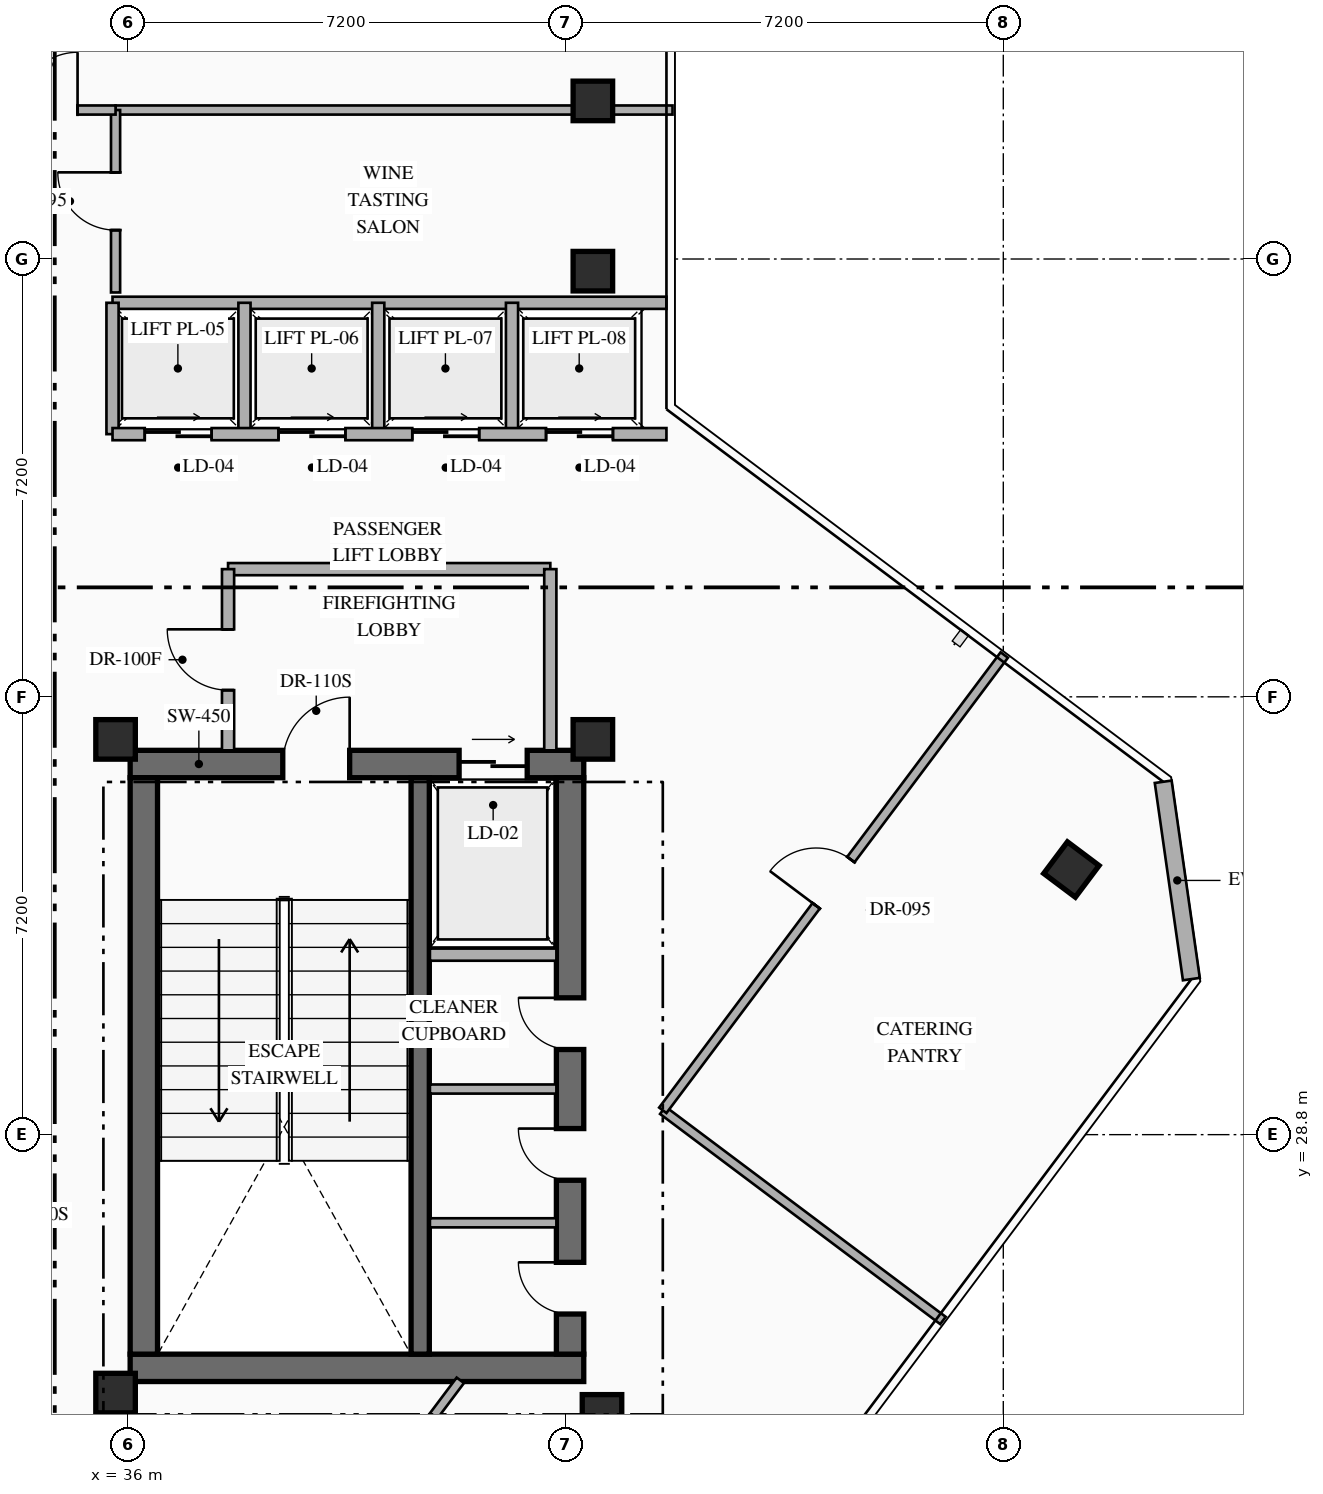
"""IFC4 building model, lengths in metres.
Left out: names, types, materials, properties, quantities, classifications, styles, units other than length and angle.
Written with IfcOpenShell. Run it as: python <this file> out.ifc"""

import sys

from ifc_helpers import new_model, si_unit, direction, frame, frame_2d, origin, origin_2d, place, context, subcontext, project, spatial, rectangle, hollow_rectangle, extrude, element, fill, save


model = new_model("IFC4")
c1 = context("Model", 3, precision=1e-05, world=origin(), true_north=direction((0.0, 1.0)))
c2 = subcontext(c1, "Body", "Model", "MODEL_VIEW")
j1 = project(units=[si_unit("LENGTHUNIT", "METRE"), si_unit("PLANEANGLEUNIT", "RADIAN")], contexts=[c1])
p1 = place(None, origin())
s1 = spatial("IfcSite", under=j1, at=p1, CompositionType="ELEMENT")
p2 = place(p1, origin())
s2 = spatial("IfcBuilding", under=s1, at=p2, CompositionType="ELEMENT")
p3 = place(p2, frame((0.0, 0.0, 261.75)))
s3 = spatial("IfcBuildingStorey", under=s2, at=p3, CompositionType="ELEMENT", Elevation=261.75)
p4 = place(p3, frame((36.04, 24.965, 0.0), z_axis=(0.0, 0.0, 1.0), x_axis=(1.0, 0.0, 0.0)))
e1 = element("IfcWall", 1, at=p4, inside=s3, PredefinedType="SHEAR", context=c2, shape_type="SweptSolid", body=[
    extrude(rectangle(XDim=7.46, YDim=0.45, at=frame_2d((3.73, 0.0))), origin(), (0.0, 0.0, 1.0), 4.2),
])
p5 = place(p3, frame((36.04, 34.895, 0.0), z_axis=(0.0, 0.0, 1.0), x_axis=(1.0, 0.0, 0.0)))
e2 = element("IfcWall", 2, at=p5, inside=s3, PredefinedType="SHEAR", context=c2, shape_type="SweptSolid", body=[
    extrude(rectangle(XDim=7.46, YDim=0.45, at=frame_2d((3.73, 0.0))), origin(), (0.0, 0.0, 1.0), 4.2),
])
p6 = place(p5, frame((2.51, 0.0, 0.0)))
e3 = element("IfcOpeningElement", 3, at=p6, cuts=e2, PredefinedType="OPENING", context=c2, shape_type="SweptSolid", body=[
    extrude(rectangle(XDim=1.1, YDim=2.2, at=frame_2d((0.55, 1.1))), frame((0.0, 0.235, 0.0), z_axis=(0.0, -1.0, 0.0), x_axis=(1.0, 0.0, 0.0)), (0.0, 0.0, 1.0), 0.47),
])
p7 = place(p5, frame((5.41, 0.0, 0.0)))
e4 = element("IfcOpeningElement", 4, at=p7, cuts=e2, PredefinedType="OPENING", context=c2, shape_type="SweptSolid", body=[
    extrude(rectangle(XDim=1.12, YDim=2.15, at=frame_2d((0.56, 1.075))), frame((0.0, 0.235, 0.0), z_axis=(0.0, -1.0, 0.0), x_axis=(1.0, 0.0, 0.0)), (0.0, 0.0, 1.0), 0.47),
])
p8 = place(p3, frame((36.265, 25.19, 0.0), z_axis=(0.0, 0.0, 1.0), x_axis=(0.0, 1.0, 0.0)))
e5 = element("IfcWall", 5, at=p8, inside=s3, PredefinedType="SHEAR", context=c2, shape_type="SweptSolid", body=[
    extrude(rectangle(XDim=9.48, YDim=0.45, at=frame_2d((4.74, 0.0))), origin(), (0.0, 0.0, 1.0), 4.2),
])
p9 = place(p3, frame((43.275, 25.19, 0.0), z_axis=(0.0, 0.0, 1.0), x_axis=(0.0, 1.0, 0.0)))
e6 = element("IfcWall", 6, at=p9, inside=s3, PredefinedType="SHEAR", context=c2, shape_type="SweptSolid", body=[
    extrude(rectangle(XDim=9.48, YDim=0.45, at=frame_2d((4.74, 0.0))), origin(), (0.0, 0.0, 1.0), 4.2),
])
p10 = place(p9, frame((0.66, 0.0, 0.0)))
e7 = element("IfcOpeningElement", 7, at=p10, cuts=e6, PredefinedType="OPENING", context=c2, shape_type="SweptSolid", body=[
    extrude(rectangle(XDim=0.85, YDim=2.08, at=frame_2d((0.425, 1.04))), frame((0.0, 0.235, 0.0), z_axis=(0.0, -1.0, 0.0), x_axis=(1.0, 0.0, 0.0)), (0.0, 0.0, 1.0), 0.47),
])
p11 = place(p9, frame((2.86, 0.0, 0.0)))
e8 = element("IfcOpeningElement", 8, at=p11, cuts=e6, PredefinedType="OPENING", context=c2, shape_type="SweptSolid", body=[
    extrude(rectangle(XDim=0.85, YDim=2.08, at=frame_2d((0.425, 1.04))), frame((0.0, 0.235, 0.0), z_axis=(0.0, -1.0, 0.0), x_axis=(1.0, 0.0, 0.0)), (0.0, 0.0, 1.0), 0.47),
])
p12 = place(p9, frame((5.01, 0.0, 0.0)))
e9 = element("IfcOpeningElement", 9, at=p12, cuts=e6, PredefinedType="OPENING", context=c2, shape_type="SweptSolid", body=[
    extrude(rectangle(XDim=0.85, YDim=2.08, at=frame_2d((0.425, 1.04))), frame((0.0, 0.235, 0.0), z_axis=(0.0, -1.0, 0.0), x_axis=(1.0, 0.0, 0.0)), (0.0, 0.0, 1.0), 0.47),
])
p13 = place(p3, frame((40.81, 25.19, 0.0), z_axis=(0.0, 0.0, 1.0), x_axis=(0.0, 1.0, 0.0)))
e10 = element("IfcWall", 10, at=p13, inside=s3, PredefinedType="SHEAR", context=c2, shape_type="SweptSolid", body=[
    extrude(rectangle(XDim=9.48, YDim=0.3, at=frame_2d((4.74, 0.0))), origin(), (0.0, 0.0, 1.0), 4.2),
])
for number, where, z_axis, x_axis in (
    (11, (35.8, 24.55, 0.0), (0.0, 0.0, 1.0), (1.0, 0.0, 0.0)),
    (12, (43.8, 24.2, 0.0), (0.0, 0.0, 1.0), (1.0, 0.0, 0.0)),
    (13, (35.8, 35.3, 0.0), (0.0, 0.0, 1.0), (1.0, 0.0, 0.0)),
    (14, (43.65, 35.3, 0.0), (0.0, 0.0, 1.0), (1.0, 0.0, 0.0)),
    (15, (43.65, 43.0, 0.0), (0.0, 0.0, 1.0), (1.0, 0.0, 0.0)),
    (16, (43.65, 45.8, 0.0), (0.0, 0.0, 1.0), (1.0, 0.0, 0.0)),
    (17, (51.52, 33.16, 0.0), (0.0, 0.0, 1.0), (0.8, -0.6, 0.0)),
):
    element("IfcColumn", number, at=place(p3, frame(where, z_axis=z_axis, x_axis=x_axis)), inside=s3, PredefinedType="COLUMN", context=c2, shape_type="SweptSolid", body=[
        extrude(hollow_rectangle(XDim=0.65, YDim=0.65, WallThickness=0.025, at=origin_2d()), origin(), (0.0, 0.0, 1.0), 4.2),
    ])
p14 = place(p3, frame((53.03, 34.603, 0.0), z_axis=(0.0, 0.0, 1.0), x_axis=(0.141212810973, -0.989979263428, 0.0)))
e18 = element("IfcWall", 18, at=p14, inside=s3, PredefinedType="STANDARD", context=c2, shape_type="SweptSolid", body=[
    extrude(rectangle(XDim=3.278, YDim=0.28, at=frame_2d((1.639, 0.0))), origin(), (0.0, 0.0, 1.0), 3.94),
])
p15 = place(p3, frame((40.97, 31.76, 0.0), z_axis=(0.0, 0.0, 1.0), x_axis=(1.0, 0.0, 0.0)))
e19 = element("IfcWall", 19, at=p15, inside=s3, PredefinedType="STANDARD", context=c2, shape_type="SweptSolid", body=[
    extrude(rectangle(XDim=2.08, YDim=0.2, at=frame_2d((1.04, 0.0))), origin(), (0.0, 0.0, 1.0), 3.94),
])
for number, where, z_axis, x_axis in (
    (20, (40.97, 27.35, 0.0), (0.0, 0.0, 1.0), (1.0, 0.0, 0.0)),
    (21, (40.97, 29.55, 0.0), (0.0, 0.0, 1.0), (1.0, 0.0, 0.0)),
):
    element("IfcWall", number, at=place(p3, frame(where, z_axis=z_axis, x_axis=x_axis)), inside=s3, PredefinedType="PARTITIONING", context=c2, shape_type="SweptSolid", body=[
        extrude(rectangle(XDim=2.08, YDim=0.15, at=frame_2d((1.04, 0.0))), origin(), (0.0, 0.0, 1.0), 3.94),
    ])
p16 = place(p3, frame((37.65, 38.1, 0.0), z_axis=(0.0, 0.0, 1.0), x_axis=(1.0, 0.0, 0.0)))
e22 = element("IfcWall", 22, at=p16, inside=s3, PredefinedType="STANDARD", context=c2, shape_type="SweptSolid", body=[
    extrude(rectangle(XDim=5.3, YDim=0.2, at=frame_2d((2.65, 0.0))), origin(), (0.0, 0.0, 1.0), 3.94),
])
p17 = place(p3, frame((42.95, 35.12, 0.0), z_axis=(0.0, 0.0, 1.0), x_axis=(0.0, 1.0, 0.0)))
e23 = element("IfcWall", 23, at=p17, inside=s3, PredefinedType="STANDARD", context=c2, shape_type="SweptSolid", body=[
    extrude(rectangle(XDim=2.98, YDim=0.2, at=frame_2d((1.49, 0.0))), origin(), (0.0, 0.0, 1.0), 3.94),
])
p18 = place(p3, frame((37.65, 35.12, 0.0), z_axis=(0.0, 0.0, 1.0), x_axis=(0.0, 1.0, 0.0)))
e24 = element("IfcWall", 24, at=p18, inside=s3, PredefinedType="STANDARD", context=c2, shape_type="SweptSolid", body=[
    extrude(rectangle(XDim=2.98, YDim=0.2, at=frame_2d((1.49, 0.0))), origin(), (0.0, 0.0, 1.0), 3.94),
])
p19 = place(p18, frame((0.99, 0.0, 0.0)))
e25 = element("IfcOpeningElement", 25, at=p19, cuts=e24, PredefinedType="OPENING", context=c2, shape_type="SweptSolid", body=[
    extrude(rectangle(XDim=1.0, YDim=2.2, at=frame_2d((0.5, 1.1))), frame((0.0, 0.11, 0.0), z_axis=(0.0, -1.0, 0.0), x_axis=(1.0, 0.0, 0.0)), (0.0, 0.0, 1.0), 0.22),
])
p20 = place(p3, frame((35.75, 42.48, 0.0), z_axis=(0.0, 0.0, 1.0), x_axis=(1.0, 0.0, 0.0)))
e26 = element("IfcWall", 26, at=p20, inside=s3, PredefinedType="STANDARD", context=c2, shape_type="SweptSolid", body=[
    extrude(rectangle(XDim=9.11, YDim=0.2, at=frame_2d((4.555, 0.0))), origin(), (0.0, 0.0, 1.0), 3.94),
])
for number, where, z_axis, x_axis in (
    (27, (35.75, 40.32, 0.0), (0.0, 0.0, 1.0), (0.0, 1.0, 0.0)),
    (28, (37.92, 40.32, 0.0), (0.0, 0.0, 1.0), (0.0, 1.0, 0.0)),
    (29, (40.12, 40.32, 0.0), (0.0, 0.0, 1.0), (0.0, 1.0, 0.0)),
    (30, (42.32, 40.32, 0.0), (0.0, 0.0, 1.0), (0.0, 1.0, 0.0)),
):
    element("IfcWall", number, at=place(p3, frame(where, z_axis=z_axis, x_axis=x_axis)), inside=s3, PredefinedType="STANDARD", context=c2, shape_type="SweptSolid", body=[
        extrude(rectangle(XDim=2.16, YDim=0.2, at=frame_2d((1.08, 0.0))), origin(), (0.0, 0.0, 1.0), 3.94),
    ])
p21 = place(p3, frame((35.75, 40.32, 0.0), z_axis=(0.0, 0.0, 1.0), x_axis=(1.0, 0.0, 0.0)))
e31 = element("IfcWall", 31, at=p21, inside=s3, PredefinedType="STANDARD", context=c2, shape_type="SweptSolid", body=[
    extrude(rectangle(XDim=9.11, YDim=0.2, at=frame_2d((4.555, 0.0))), origin(), (0.0, 0.0, 1.0), 3.94),
])
p22 = place(p21, frame((0.53, 0.0, 0.0)))
e32 = element("IfcOpeningElement", 32, at=p22, cuts=e31, PredefinedType="OPENING", context=c2, shape_type="SweptSolid", body=[
    extrude(rectangle(XDim=1.1, YDim=2.18, at=frame_2d((0.55, 1.09))), frame((0.0, 0.11, 0.0), z_axis=(0.0, -1.0, 0.0), x_axis=(1.0, 0.0, 0.0)), (0.0, 0.0, 1.0), 0.22),
])
p23 = place(p21, frame((2.73, 0.0, 0.0)))
e33 = element("IfcOpeningElement", 33, at=p23, cuts=e31, PredefinedType="OPENING", context=c2, shape_type="SweptSolid", body=[
    extrude(rectangle(XDim=1.1, YDim=2.18, at=frame_2d((0.55, 1.09))), frame((0.0, 0.11, 0.0), z_axis=(0.0, -1.0, 0.0), x_axis=(1.0, 0.0, 0.0)), (0.0, 0.0, 1.0), 0.22),
])
p24 = place(p21, frame((4.93, 0.0, 0.0)))
e34 = element("IfcOpeningElement", 34, at=p24, cuts=e31, PredefinedType="OPENING", context=c2, shape_type="SweptSolid", body=[
    extrude(rectangle(XDim=1.1, YDim=2.18, at=frame_2d((0.55, 1.09))), frame((0.0, 0.11, 0.0), z_axis=(0.0, -1.0, 0.0), x_axis=(1.0, 0.0, 0.0)), (0.0, 0.0, 1.0), 0.22),
])
p25 = place(p21, frame((7.13, 0.0, 0.0)))
e35 = element("IfcOpeningElement", 35, at=p25, cuts=e31, PredefinedType="OPENING", context=c2, shape_type="SweptSolid", body=[
    extrude(rectangle(XDim=1.1, YDim=2.18, at=frame_2d((0.55, 1.09))), frame((0.0, 0.11, 0.0), z_axis=(0.0, -1.0, 0.0), x_axis=(1.0, 0.0, 0.0)), (0.0, 0.0, 1.0), 0.22),
])
p26 = place(p3, frame((35.8, 45.65, 0.0), z_axis=(0.0, 0.0, 1.0), x_axis=(1.0, 0.0, 0.0)))
e36 = element("IfcWall", 36, at=p26, inside=s3, PredefinedType="PARTITIONING", context=c2, shape_type="SweptSolid", body=[
    extrude(rectangle(XDim=9.16, YDim=0.15, at=frame_2d((4.58, 0.0))), origin(), (0.0, 0.0, 1.0), 3.357),
])
p27 = place(p3, frame((35.8, 42.65, 0.0), z_axis=(0.0, 0.0, 1.0), x_axis=(0.0, 1.0, 0.0)))
e37 = element("IfcWall", 37, at=p27, inside=s3, PredefinedType="PARTITIONING", context=c2, shape_type="SweptSolid", body=[
    extrude(rectangle(XDim=3.0, YDim=0.15, at=frame_2d((1.5, 0.0))), origin(), (0.0, 0.0, 1.0), 3.94),
])
p28 = place(p27, frame((1.025, 0.0, 0.0)))
e38 = element("IfcOpeningElement", 38, at=p28, cuts=e37, PredefinedType="OPENING", context=c2, shape_type="SweptSolid", body=[
    extrude(rectangle(XDim=0.95, YDim=2.15, at=frame_2d((0.475, 1.075))), frame((0.0, 0.085, 0.0), z_axis=(0.0, -1.0, 0.0), x_axis=(1.0, 0.0, 0.0)), (0.0, 0.0, 1.0), 0.17),
])
p29 = place(p3, frame((28.47, 25.76, 0.0), z_axis=(0.0, 0.0, 1.0), x_axis=(0.800001748029, -0.599997669287, 0.0)))
e39 = element("IfcWall", 39, at=p29, inside=s3, PredefinedType="PARTITIONING", context=c2, shape_type="SweptSolid", body=[
    extrude(rectangle(XDim=16.76, YDim=0.15, at=frame_2d((8.38, 0.0))), origin(), (0.0, 0.0, 1.0), 3.94),
])
p30 = place(p29, frame((7.905, 0.0, 0.0)))
e40 = element("IfcOpeningElement", 40, at=p30, cuts=e39, PredefinedType="OPENING", context=c2, shape_type="SweptSolid", body=[
    extrude(rectangle(XDim=0.95, YDim=2.15, at=frame_2d((0.475, 1.075))), frame((0.0, 0.085, 0.0), z_axis=(0.0, -1.0, 0.0), x_axis=(1.0, 0.0, 0.0)), (0.0, 0.0, 1.0), 0.17),
])
p31 = place(p3, frame((33.6, 45.65, 0.0), z_axis=(0.0, 0.0, 1.0), x_axis=(1.0, 0.0, 0.0)))
e41 = element("IfcWall", 41, at=p31, inside=s3, PredefinedType="PARTITIONING", context=c2, shape_type="SweptSolid", body=[
    extrude(rectangle(XDim=2.2, YDim=0.15, at=frame_2d((1.1, 0.0))), origin(), (0.0, 0.0, 1.0), 3.357),
])
p32 = place(p31, frame((0.625, 0.0, 0.0)))
e42 = element("IfcOpeningElement", 42, at=p32, cuts=e41, PredefinedType="OPENING", context=c2, shape_type="SweptSolid", body=[
    extrude(rectangle(XDim=0.95, YDim=2.15, at=frame_2d((0.475, 1.075))), frame((0.0, 0.085, 0.0), z_axis=(0.0, -1.0, 0.0), x_axis=(1.0, 0.0, 0.0)), (0.0, 0.0, 1.0), 0.17),
])
p33 = place(p3, frame((44.8, 29.2, 0.0), z_axis=(0.0, 0.0, 1.0), x_axis=(0.79998982729, -0.600013563374, 0.0)))
e43 = element("IfcWall", 43, at=p33, inside=s3, PredefinedType="PARTITIONING", context=c2, shape_type="SweptSolid", body=[
    extrude(rectangle(XDim=5.76, YDim=0.15, at=frame_2d((2.88, 0.0))), origin(), (0.0, 0.0, 1.0), 3.94),
])
p34 = place(p3, frame((38.35, 20.6, 0.0), z_axis=(0.0, 0.0, 1.0), x_axis=(0.599992487743, 0.800005634138, 0.0)))
e44 = element("IfcWall", 44, at=p34, inside=s3, PredefinedType="PARTITIONING", context=c2, shape_type="SweptSolid", body=[
    extrude(rectangle(XDim=5.2, YDim=0.15, at=frame_2d((2.6, 0.0))), origin(), (0.0, 0.0, 1.0), 3.94),
])
p35 = place(p34, frame((2.05, 0.0, 0.0)))
e45 = element("IfcOpeningElement", 45, at=p35, cuts=e44, PredefinedType="OPENING", context=c2, shape_type="SweptSolid", body=[
    extrude(rectangle(XDim=1.1, YDim=2.16, at=frame_2d((0.55, 1.08))), frame((0.0, 0.085, 0.0), z_axis=(0.0, -1.0, 0.0), x_axis=(1.0, 0.0, 0.0)), (0.0, 0.0, 1.0), 0.17),
])
p36 = place(p3, frame((44.8, 29.2, 0.0), z_axis=(0.0, 0.0, 1.0), x_axis=(0.599995826652, 0.800003129994, 0.0)))
e46 = element("IfcWall", 46, at=p36, inside=s3, PredefinedType="PARTITIONING", context=c2, shape_type="SweptSolid", body=[
    extrude(rectangle(XDim=9.36, YDim=0.15, at=frame_2d((4.68, 0.0))), origin(), (0.0, 0.0, 1.0), 3.94),
])
p37 = place(p36, frame((4.205, 0.0, 0.0)))
e47 = element("IfcOpeningElement", 47, at=p37, cuts=e46, PredefinedType="OPENING", context=c2, shape_type="SweptSolid", body=[
    extrude(rectangle(XDim=0.95, YDim=2.15, at=frame_2d((0.475, 1.075))), frame((0.0, 0.085, 0.0), z_axis=(0.0, -1.0, 0.0), x_axis=(1.0, 0.0, 0.0)), (0.0, 0.0, 1.0), 0.17),
])
p38 = place(p6, origin())
e48 = element("IfcDoor", 48, at=p38, inside=s3, OperationType="SINGLE_SWING_RIGHT", PredefinedType="DOOR", context=c2, shape_type="SweptSolid", body=[
    extrude(rectangle(XDim=1.1, YDim=2.2, at=frame_2d((0.55, 1.1))), frame((0.0, 0.025, 0.0), z_axis=(0.0, -1.0, 0.0), x_axis=(1.0, 0.0, 0.0)), (0.0, 0.0, 1.0), 0.05),
])
fill(e3, e48)
p39 = place(p7, origin())
e49 = element("IfcDoor", 49, at=p39, inside=s3, OperationType="SLIDING_TO_RIGHT", PredefinedType="USERDEFINED", context=c2, shape_type="SweptSolid", body=[
    extrude(rectangle(XDim=1.12, YDim=2.15, at=frame_2d((0.56, 1.075))), frame((0.0, 0.025, 0.0), z_axis=(0.0, -1.0, 0.0), x_axis=(1.0, 0.0, 0.0)), (0.0, 0.0, 1.0), 0.05),
])
fill(e4, e49)
p40 = place(p10, origin())
e50 = element("IfcDoor", 50, at=p40, inside=s3, OperationType="SINGLE_SWING_RIGHT", PredefinedType="DOOR", context=c2, shape_type="SweptSolid", body=[
    extrude(rectangle(XDim=0.85, YDim=2.08, at=frame_2d((0.425, 1.04))), frame((0.0, 0.025, 0.0), z_axis=(0.0, -1.0, 0.0), x_axis=(1.0, 0.0, 0.0)), (0.0, 0.0, 1.0), 0.05),
])
fill(e7, e50)
p41 = place(p11, origin())
e51 = element("IfcDoor", 51, at=p41, inside=s3, OperationType="SINGLE_SWING_RIGHT", PredefinedType="DOOR", context=c2, shape_type="SweptSolid", body=[
    extrude(rectangle(XDim=0.85, YDim=2.08, at=frame_2d((0.425, 1.04))), frame((0.0, 0.025, 0.0), z_axis=(0.0, -1.0, 0.0), x_axis=(1.0, 0.0, 0.0)), (0.0, 0.0, 1.0), 0.05),
])
fill(e8, e51)
p42 = place(p12, origin())
e52 = element("IfcDoor", 52, at=p42, inside=s3, OperationType="SINGLE_SWING_RIGHT", PredefinedType="DOOR", context=c2, shape_type="SweptSolid", body=[
    extrude(rectangle(XDim=0.85, YDim=2.08, at=frame_2d((0.425, 1.04))), frame((0.0, 0.025, 0.0), z_axis=(0.0, -1.0, 0.0), x_axis=(1.0, 0.0, 0.0)), (0.0, 0.0, 1.0), 0.05),
])
fill(e9, e52)
p43 = place(p19, origin())
e53 = element("IfcDoor", 53, at=p43, inside=s3, OperationType="SINGLE_SWING_RIGHT", PredefinedType="DOOR", context=c2, shape_type="SweptSolid", body=[
    extrude(rectangle(XDim=1.0, YDim=2.2, at=frame_2d((0.5, 1.1))), frame((0.0, 0.025, 0.0), z_axis=(0.0, -1.0, 0.0), x_axis=(1.0, 0.0, 0.0)), (0.0, 0.0, 1.0), 0.05),
])
fill(e25, e53)
p44 = place(p22, origin())
e54 = element("IfcDoor", 54, at=p44, inside=s3, OperationType="SLIDING_TO_RIGHT", PredefinedType="USERDEFINED", context=c2, shape_type="SweptSolid", body=[
    extrude(rectangle(XDim=1.1, YDim=2.18, at=frame_2d((0.55, 1.09))), frame((0.0, 0.025, 0.0), z_axis=(0.0, -1.0, 0.0), x_axis=(1.0, 0.0, 0.0)), (0.0, 0.0, 1.0), 0.05),
])
fill(e32, e54)
p45 = place(p23, origin())
e55 = element("IfcDoor", 55, at=p45, inside=s3, OperationType="SLIDING_TO_RIGHT", PredefinedType="USERDEFINED", context=c2, shape_type="SweptSolid", body=[
    extrude(rectangle(XDim=1.1, YDim=2.18, at=frame_2d((0.55, 1.09))), frame((0.0, 0.025, 0.0), z_axis=(0.0, -1.0, 0.0), x_axis=(1.0, 0.0, 0.0)), (0.0, 0.0, 1.0), 0.05),
])
fill(e33, e55)
p46 = place(p24, origin())
e56 = element("IfcDoor", 56, at=p46, inside=s3, OperationType="SLIDING_TO_RIGHT", PredefinedType="USERDEFINED", context=c2, shape_type="SweptSolid", body=[
    extrude(rectangle(XDim=1.1, YDim=2.18, at=frame_2d((0.55, 1.09))), frame((0.0, 0.025, 0.0), z_axis=(0.0, -1.0, 0.0), x_axis=(1.0, 0.0, 0.0)), (0.0, 0.0, 1.0), 0.05),
])
fill(e34, e56)
p47 = place(p25, origin())
e57 = element("IfcDoor", 57, at=p47, inside=s3, OperationType="SLIDING_TO_RIGHT", PredefinedType="USERDEFINED", context=c2, shape_type="SweptSolid", body=[
    extrude(rectangle(XDim=1.1, YDim=2.18, at=frame_2d((0.55, 1.09))), frame((0.0, 0.025, 0.0), z_axis=(0.0, -1.0, 0.0), x_axis=(1.0, 0.0, 0.0)), (0.0, 0.0, 1.0), 0.05),
])
fill(e35, e57)
p48 = place(p28, origin())
e58 = element("IfcDoor", 58, at=p48, inside=s3, OperationType="SINGLE_SWING_RIGHT", PredefinedType="DOOR", context=c2, shape_type="SweptSolid", body=[
    extrude(rectangle(XDim=0.95, YDim=2.15, at=frame_2d((0.475, 1.075))), frame((0.0, 0.025, 0.0), z_axis=(0.0, -1.0, 0.0), x_axis=(1.0, 0.0, 0.0)), (0.0, 0.0, 1.0), 0.05),
])
fill(e38, e58)
p49 = place(p32, origin())
e59 = element("IfcDoor", 59, at=p49, inside=s3, OperationType="SINGLE_SWING_RIGHT", PredefinedType="DOOR", context=c2, shape_type="SweptSolid", body=[
    extrude(rectangle(XDim=0.95, YDim=2.15, at=frame_2d((0.475, 1.075))), frame((0.0, 0.025, 0.0), z_axis=(0.0, -1.0, 0.0), x_axis=(1.0, 0.0, 0.0)), (0.0, 0.0, 1.0), 0.05),
])
fill(e42, e59)
p50 = place(p37, origin())
e60 = element("IfcDoor", 60, at=p50, inside=s3, OperationType="SINGLE_SWING_LEFT", PredefinedType="DOOR", context=c2, shape_type="SweptSolid", body=[
    extrude(rectangle(XDim=0.95, YDim=2.15, at=frame_2d((0.475, 1.075))), frame((0.0, 0.025, 0.0), z_axis=(0.0, -1.0, 0.0), x_axis=(1.0, 0.0, 0.0)), (0.0, 0.0, 1.0), 0.05),
])
fill(e47, e60)
save(model, sys.argv[1])
